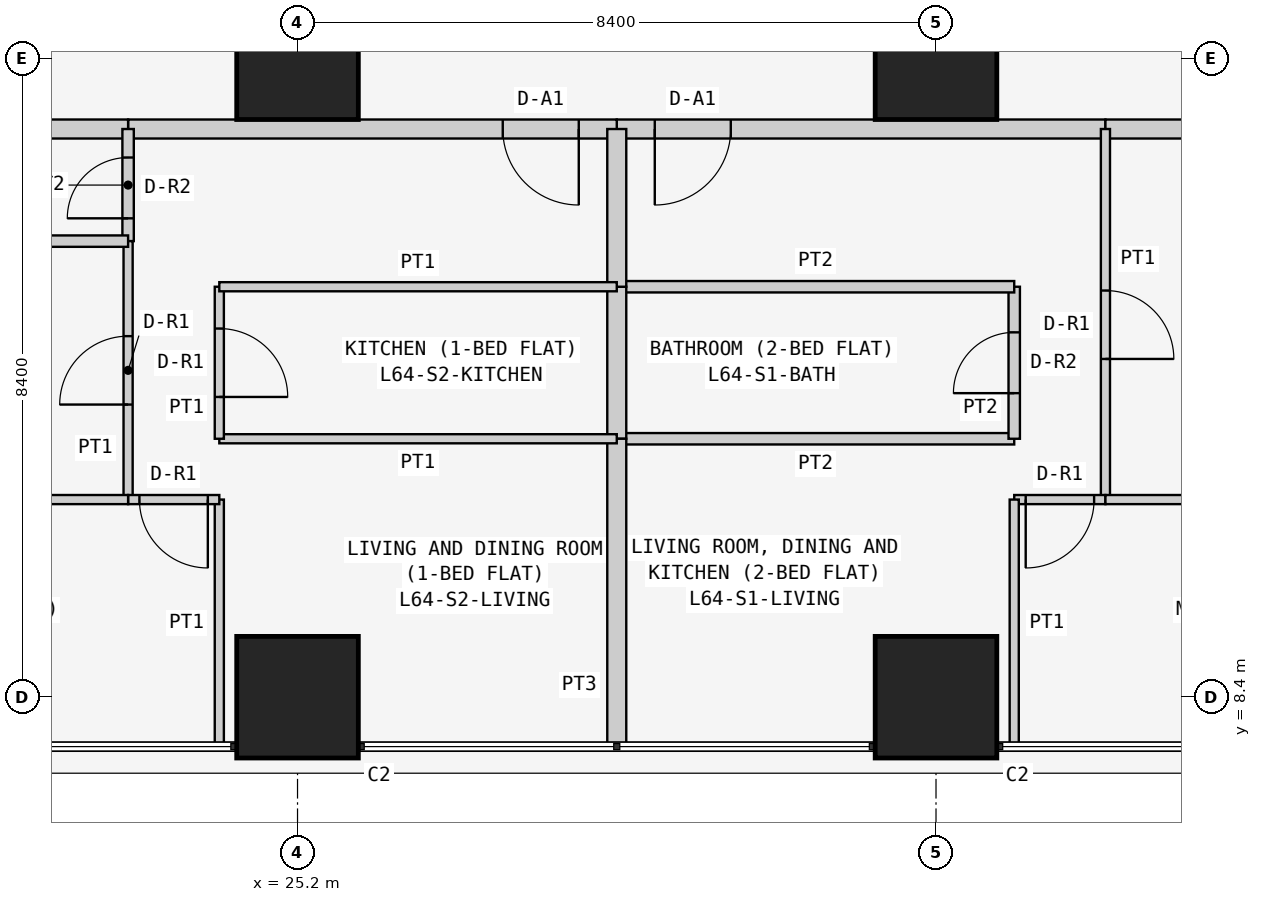
"""IFC4 building model, lengths in metres.
Left out: names, types, materials, properties, quantities, classifications, styles, units other than length and angle.
Written with IfcOpenShell. Run it as: python <this file> out.ifc"""

import sys

from ifc_helpers import new_model, si_unit, direction, frame, frame_2d, origin, origin_2d, place, context, subcontext, project, spatial, rectangle, extrude, element, fill, save


model = new_model("IFC4")
c1 = context("Model", 3, precision=1e-05, world=origin(), true_north=direction((0.0, 1.0)))
c2 = subcontext(c1, "Body", "Model", "MODEL_VIEW")
j1 = project(units=[si_unit("LENGTHUNIT", "METRE"), si_unit("PLANEANGLEUNIT", "RADIAN")], contexts=[c1])
p1 = place(None, origin())
s1 = spatial("IfcSite", under=j1, at=p1, CompositionType="ELEMENT")
p2 = place(p1, origin())
s2 = spatial("IfcBuilding", under=s1, at=p2, CompositionType="ELEMENT")
p3 = place(p2, frame((0.0, 0.0, 244.5)))
s3 = spatial("IfcBuildingStorey", under=s2, at=p3, CompositionType="ELEMENT", Elevation=244.5)
for number, where, z_axis, x_axis in (
    (1, (25.2, 8.4, 0.0), (0.0, 0.0, 1.0), (1.0, 0.0, 0.0)),
    (2, (25.2, 16.8, 0.0), (0.0, 0.0, 1.0), (1.0, 0.0, 0.0)),
    (3, (33.6, 8.4, 0.0), (0.0, 0.0, 1.0), (1.0, 0.0, 0.0)),
    (4, (33.6, 16.8, 0.0), (0.0, 0.0, 1.0), (1.0, 0.0, 0.0)),
):
    element("IfcColumn", number, at=place(p3, frame(where, z_axis=z_axis, x_axis=x_axis)), inside=s3, PredefinedType="COLUMN", context=c2, shape_type="SweptSolid", body=[
        extrude(rectangle(XDim=1.6, YDim=1.6, at=origin_2d()), origin(), (0.0, 0.0, 1.0), 3.6),
    ])
p4 = place(p3, frame((35.829, 15.875, 0.0), z_axis=(0.0, 0.0, 1.0), x_axis=(-1.0, 0.0, 0.0)))
e5 = element("IfcWall", 5, at=p4, inside=s3, PredefinedType="PARTITIONING", context=c2, shape_type="SweptSolid", body=[
    extrude(rectangle(XDim=6.429, YDim=0.25, at=frame_2d((3.215, 0.0))), origin(), (0.0, 0.0, 1.0), 3.35),
])
p5 = place(p4, frame((4.929, 0.0, 0.0)))
e6 = element("IfcOpeningElement", 6, at=p5, cuts=e5, PredefinedType="OPENING", context=c2, shape_type="SweptSolid", body=[
    extrude(rectangle(XDim=1.0, YDim=2.1, at=frame_2d((0.5, 1.05))), frame((0.0, 0.135, 0.0), z_axis=(0.0, -1.0, 0.0), x_axis=(1.0, 0.0, 0.0)), (0.0, 0.0, 1.0), 0.27),
])
p6 = place(p3, frame((42.7, 15.875, 0.0), z_axis=(0.0, 0.0, 1.0), x_axis=(-1.0, 0.0, 0.0)))
e7 = element("IfcWall", 7, at=p6, inside=s3, PredefinedType="PARTITIONING", context=c2, shape_type="SweptSolid", body=[
    extrude(rectangle(XDim=6.871, YDim=0.25, at=frame_2d((3.436, 0.0))), origin(), (0.0, 0.0, 1.0), 3.35),
])
p7 = place(p3, frame((29.4, 15.875, 0.0), z_axis=(0.0, 0.0, 1.0), x_axis=(-1.0, 0.0, 0.0)))
e8 = element("IfcWall", 8, at=p7, inside=s3, PredefinedType="PARTITIONING", context=c2, shape_type="SweptSolid", body=[
    extrude(rectangle(XDim=6.429, YDim=0.25, at=frame_2d((3.214, 0.0))), origin(), (0.0, 0.0, 1.0), 3.35),
])
p8 = place(p7, frame((0.5, 0.0, 0.0)))
e9 = element("IfcOpeningElement", 9, at=p8, cuts=e8, PredefinedType="OPENING", context=c2, shape_type="SweptSolid", body=[
    extrude(rectangle(XDim=1.0, YDim=2.1, at=frame_2d((0.5, 1.05))), frame((0.0, 0.135, 0.0), z_axis=(0.0, -1.0, 0.0), x_axis=(1.0, 0.0, 0.0)), (0.0, 0.0, 1.0), 0.27),
])
p9 = place(p3, frame((22.971, 15.875, 0.0), z_axis=(0.0, 0.0, 1.0), x_axis=(-1.0, 0.0, 0.0)))
e10 = element("IfcWall", 10, at=p9, inside=s3, PredefinedType="PARTITIONING", context=c2, shape_type="SweptSolid", body=[
    extrude(rectangle(XDim=6.871, YDim=0.25, at=frame_2d((3.436, 0.0))), origin(), (0.0, 0.0, 1.0), 3.35),
])
p10 = place(p3, frame((29.4, 11.8, 0.0), z_axis=(0.0, 0.0, 1.0), x_axis=(1.0, 0.0, 0.0)))
e11 = element("IfcWall", 11, at=p10, inside=s3, PredefinedType="PARTITIONING", context=c2, shape_type="SweptSolid", body=[
    extrude(rectangle(XDim=5.229, YDim=0.15, at=frame_2d((2.615, 0.0))), origin(), (0.0, 0.0, 1.0), 3.35),
])
p11 = place(p3, frame((34.629, 11.8, 0.0), z_axis=(0.0, 0.0, 1.0), x_axis=(0.0, 1.0, 0.0)))
e12 = element("IfcWall", 12, at=p11, inside=s3, PredefinedType="PARTITIONING", context=c2, shape_type="SweptSolid", body=[
    extrude(rectangle(XDim=2.0, YDim=0.15, at=frame_2d((1.0, 0.0))), origin(), (0.0, 0.0, 1.0), 3.35),
])
p12 = place(p11, frame((0.6, 0.0, 0.0)))
e13 = element("IfcOpeningElement", 13, at=p12, cuts=e12, PredefinedType="OPENING", context=c2, shape_type="SweptSolid", body=[
    extrude(rectangle(XDim=0.8, YDim=2.1, at=frame_2d((0.4, 1.05))), frame((0.0, 0.085, 0.0), z_axis=(0.0, -1.0, 0.0), x_axis=(1.0, 0.0, 0.0)), (0.0, 0.0, 1.0), 0.17),
])
p13 = place(p3, frame((34.629, 13.8, 0.0), z_axis=(0.0, 0.0, 1.0), x_axis=(-1.0, 0.0, 0.0)))
e14 = element("IfcWall", 14, at=p13, inside=s3, PredefinedType="PARTITIONING", context=c2, shape_type="SweptSolid", body=[
    extrude(rectangle(XDim=5.229, YDim=0.15, at=frame_2d((2.615, 0.0))), origin(), (0.0, 0.0, 1.0), 3.35),
])
p14 = place(p3, frame((29.4, 13.8, 0.0), z_axis=(0.0, 0.0, 1.0), x_axis=(0.0, -1.0, 0.0)))
e15 = element("IfcWall", 15, at=p14, inside=s3, PredefinedType="PARTITIONING", context=c2, shape_type="SweptSolid", body=[
    extrude(rectangle(XDim=2.0, YDim=0.25, at=frame_2d((1.0, 0.0))), origin(), (0.0, 0.0, 1.0), 2.667),
])
p15 = place(p3, frame((35.829, 15.875, 0.0), z_axis=(0.0, 0.0, 1.0), x_axis=(0.0, -1.0, 0.0)))
e16 = element("IfcWall", 16, at=p15, inside=s3, PredefinedType="PARTITIONING", context=c2, shape_type="SweptSolid", body=[
    extrude(rectangle(XDim=4.875, YDim=0.12, at=frame_2d((2.438, 0.0))), origin(), (0.0, 0.0, 1.0), 3.35),
])
p16 = place(p15, frame((2.125, 0.0, 0.0)))
e17 = element("IfcOpeningElement", 17, at=p16, cuts=e16, PredefinedType="OPENING", context=c2, shape_type="SweptSolid", body=[
    extrude(rectangle(XDim=0.9, YDim=2.1, at=frame_2d((0.45, 1.05))), frame((0.0, 0.07, 0.0), z_axis=(0.0, -1.0, 0.0), x_axis=(1.0, 0.0, 0.0)), (0.0, 0.0, 1.0), 0.14),
])
p17 = place(p3, frame((35.829, 11.0, 0.0), z_axis=(0.0, 0.0, 1.0), x_axis=(-1.0, 0.0, 0.0)))
e18 = element("IfcWall", 18, at=p17, inside=s3, PredefinedType="PARTITIONING", context=c2, shape_type="SweptSolid", body=[
    extrude(rectangle(XDim=1.2, YDim=0.12, at=frame_2d((0.6, 0.0))), origin(), (0.0, 0.0, 1.0), 3.35),
])
p18 = place(p17, frame((0.149, 0.0, 0.0)))
e19 = element("IfcOpeningElement", 19, at=p18, cuts=e18, PredefinedType="OPENING", context=c2, shape_type="SweptSolid", body=[
    extrude(rectangle(XDim=0.9, YDim=2.1, at=frame_2d((0.45, 1.05))), frame((0.0, 0.07, 0.0), z_axis=(0.0, -1.0, 0.0), x_axis=(1.0, 0.0, 0.0)), (0.0, 0.0, 1.0), 0.14),
])
p19 = place(p3, frame((34.629, 11.0, 0.0), z_axis=(0.0, 0.0, 1.0), x_axis=(0.0, -1.0, 0.0)))
e20 = element("IfcWall", 20, at=p19, inside=s3, PredefinedType="PARTITIONING", context=c2, shape_type="SweptSolid", body=[
    extrude(rectangle(XDim=3.25, YDim=0.12, at=frame_2d((1.625, 0.0))), origin(), (0.0, 0.0, 1.0), 3.35),
])
p20 = place(p3, frame((29.4, 7.75, 0.0), z_axis=(0.0, 0.0, 1.0), x_axis=(0.0, 1.0, 0.0)))
e21 = element("IfcWall", 21, at=p20, inside=s3, PredefinedType="PARTITIONING", context=c2, shape_type="SweptSolid", body=[
    extrude(rectangle(XDim=4.05, YDim=0.25, at=frame_2d((2.025, 0.0))), origin(), (0.0, 0.0, 1.0), 2.667),
])
p21 = place(p3, frame((29.4, 13.8, 0.0), z_axis=(0.0, 0.0, 1.0), x_axis=(0.0, 1.0, 0.0)))
e22 = element("IfcWall", 22, at=p21, inside=s3, PredefinedType="PARTITIONING", context=c2, shape_type="SweptSolid", body=[
    extrude(rectangle(XDim=2.075, YDim=0.25, at=frame_2d((1.038, 0.0))), origin(), (0.0, 0.0, 1.0), 2.667),
])
p22 = place(p3, frame((35.829, 11.0, 0.0), z_axis=(0.0, 0.0, 1.0), x_axis=(1.0, 0.0, 0.0)))
e23 = element("IfcWall", 23, at=p22, inside=s3, PredefinedType="PARTITIONING", context=c2, shape_type="SweptSolid", body=[
    extrude(rectangle(XDim=6.871, YDim=0.12, at=frame_2d((3.436, 0.0))), origin(), (0.0, 0.0, 1.0), 3.35),
])
p23 = place(p3, frame((29.4, 11.8, 0.0), z_axis=(0.0, 0.0, 1.0), x_axis=(-1.0, 0.0, 0.0)))
e24 = element("IfcWall", 24, at=p23, inside=s3, PredefinedType="PARTITIONING", context=c2, shape_type="SweptSolid", body=[
    extrude(rectangle(XDim=5.229, YDim=0.12, at=frame_2d((2.615, 0.0))), origin(), (0.0, 0.0, 1.0), 3.35),
])
p24 = place(p3, frame((24.171, 11.8, 0.0), z_axis=(0.0, 0.0, 1.0), x_axis=(0.0, 1.0, 0.0)))
e25 = element("IfcWall", 25, at=p24, inside=s3, PredefinedType="PARTITIONING", context=c2, shape_type="SweptSolid", body=[
    extrude(rectangle(XDim=2.0, YDim=0.12, at=frame_2d((1.0, 0.0))), origin(), (0.0, 0.0, 1.0), 3.35),
])
p25 = place(p24, frame((0.55, 0.0, 0.0)))
e26 = element("IfcOpeningElement", 26, at=p25, cuts=e25, PredefinedType="OPENING", context=c2, shape_type="SweptSolid", body=[
    extrude(rectangle(XDim=0.9, YDim=2.1, at=frame_2d((0.45, 1.05))), frame((0.0, 0.07, 0.0), z_axis=(0.0, -1.0, 0.0), x_axis=(1.0, 0.0, 0.0)), (0.0, 0.0, 1.0), 0.14),
])
p26 = place(p3, frame((24.171, 13.8, 0.0), z_axis=(0.0, 0.0, 1.0), x_axis=(1.0, 0.0, 0.0)))
e27 = element("IfcWall", 27, at=p26, inside=s3, PredefinedType="PARTITIONING", context=c2, shape_type="SweptSolid", body=[
    extrude(rectangle(XDim=5.229, YDim=0.12, at=frame_2d((2.615, 0.0))), origin(), (0.0, 0.0, 1.0), 3.35),
])
p27 = place(p3, frame((22.971, 14.4, 0.0), z_axis=(0.0, 0.0, 1.0), x_axis=(0.0, 1.0, 0.0)))
e28 = element("IfcWall", 28, at=p27, inside=s3, PredefinedType="PARTITIONING", context=c2, shape_type="SweptSolid", body=[
    extrude(rectangle(XDim=1.475, YDim=0.15, at=frame_2d((0.738, 0.0))), origin(), (0.0, 0.0, 1.0), 3.35),
])
p28 = place(p27, frame((0.3, 0.0, 0.0)))
e29 = element("IfcOpeningElement", 29, at=p28, cuts=e28, PredefinedType="OPENING", context=c2, shape_type="SweptSolid", body=[
    extrude(rectangle(XDim=0.8, YDim=2.1, at=frame_2d((0.4, 1.05))), frame((0.0, 0.085, 0.0), z_axis=(0.0, -1.0, 0.0), x_axis=(1.0, 0.0, 0.0)), (0.0, 0.0, 1.0), 0.17),
])
p29 = place(p3, frame((22.971, 11.0, 0.0), z_axis=(0.0, 0.0, 1.0), x_axis=(0.0, 1.0, 0.0)))
e30 = element("IfcWall", 30, at=p29, inside=s3, PredefinedType="PARTITIONING", context=c2, shape_type="SweptSolid", body=[
    extrude(rectangle(XDim=3.4, YDim=0.12, at=frame_2d((1.7, 0.0))), origin(), (0.0, 0.0, 1.0), 3.35),
])
p30 = place(p29, frame((1.25, 0.0, 0.0)))
e31 = element("IfcOpeningElement", 31, at=p30, cuts=e30, PredefinedType="OPENING", context=c2, shape_type="SweptSolid", body=[
    extrude(rectangle(XDim=0.9, YDim=2.1, at=frame_2d((0.45, 1.05))), frame((0.0, 0.07, 0.0), z_axis=(0.0, -1.0, 0.0), x_axis=(1.0, 0.0, 0.0)), (0.0, 0.0, 1.0), 0.14),
])
p31 = place(p3, frame((24.171, 7.75, 0.0), z_axis=(0.0, 0.0, 1.0), x_axis=(0.0, 1.0, 0.0)))
e32 = element("IfcWall", 32, at=p31, inside=s3, PredefinedType="PARTITIONING", context=c2, shape_type="SweptSolid", body=[
    extrude(rectangle(XDim=3.25, YDim=0.12, at=frame_2d((1.625, 0.0))), origin(), (0.0, 0.0, 1.0), 3.35),
])
p32 = place(p3, frame((24.171, 11.0, 0.0), z_axis=(0.0, 0.0, 1.0), x_axis=(-1.0, 0.0, 0.0)))
e33 = element("IfcWall", 33, at=p32, inside=s3, PredefinedType="PARTITIONING", context=c2, shape_type="SweptSolid", body=[
    extrude(rectangle(XDim=1.2, YDim=0.12, at=frame_2d((0.6, 0.0))), origin(), (0.0, 0.0, 1.0), 3.35),
])
p33 = place(p32, frame((0.151, 0.0, 0.0)))
e34 = element("IfcOpeningElement", 34, at=p33, cuts=e33, PredefinedType="OPENING", context=c2, shape_type="SweptSolid", body=[
    extrude(rectangle(XDim=0.9, YDim=2.1, at=frame_2d((0.45, 1.05))), frame((0.0, 0.07, 0.0), z_axis=(0.0, -1.0, 0.0), x_axis=(1.0, 0.0, 0.0)), (0.0, 0.0, 1.0), 0.14),
])
p34 = place(p3, frame((22.971, 14.4, 0.0), z_axis=(0.0, 0.0, 1.0), x_axis=(-1.0, 0.0, 0.0)))
e35 = element("IfcWall", 35, at=p34, inside=s3, PredefinedType="PARTITIONING", context=c2, shape_type="SweptSolid", body=[
    extrude(rectangle(XDim=6.871, YDim=0.15, at=frame_2d((3.436, 0.0))), origin(), (0.0, 0.0, 1.0), 3.35),
])
p35 = place(p3, frame((22.971, 11.0, 0.0), z_axis=(0.0, 0.0, 1.0), x_axis=(-1.0, 0.0, 0.0)))
e36 = element("IfcWall", 36, at=p35, inside=s3, PredefinedType="PARTITIONING", context=c2, shape_type="SweptSolid", body=[
    extrude(rectangle(XDim=6.871, YDim=0.12, at=frame_2d((3.436, 0.0))), origin(), (0.0, 0.0, 1.0), 3.35),
])
p36 = place(p5, origin())
e37 = element("IfcDoor", 37, at=p36, inside=s3, OperationType="SINGLE_SWING_RIGHT", PredefinedType="DOOR", context=c2, shape_type="SweptSolid", body=[
    extrude(rectangle(XDim=1.0, YDim=2.1, at=frame_2d((0.5, 1.05))), frame((0.0, 0.025, 0.0), z_axis=(0.0, -1.0, 0.0), x_axis=(1.0, 0.0, 0.0)), (0.0, 0.0, 1.0), 0.05),
])
fill(e6, e37)
p37 = place(p12, origin())
e38 = element("IfcDoor", 38, at=p37, inside=s3, OperationType="SINGLE_SWING_LEFT", PredefinedType="DOOR", context=c2, shape_type="SweptSolid", body=[
    extrude(rectangle(XDim=0.8, YDim=2.1, at=frame_2d((0.4, 1.05))), frame((0.0, 0.025, 0.0), z_axis=(0.0, -1.0, 0.0), x_axis=(1.0, 0.0, 0.0)), (0.0, 0.0, 1.0), 0.05),
])
fill(e13, e38)
p38 = place(p16, origin())
e39 = element("IfcDoor", 39, at=p38, inside=s3, OperationType="SINGLE_SWING_RIGHT", PredefinedType="DOOR", context=c2, shape_type="SweptSolid", body=[
    extrude(rectangle(XDim=0.9, YDim=2.1, at=frame_2d((0.45, 1.05))), frame((0.0, 0.025, 0.0), z_axis=(0.0, -1.0, 0.0), x_axis=(1.0, 0.0, 0.0)), (0.0, 0.0, 1.0), 0.05),
])
fill(e17, e39)
p39 = place(p18, origin())
e40 = element("IfcDoor", 40, at=p39, inside=s3, OperationType="SINGLE_SWING_RIGHT", PredefinedType="DOOR", context=c2, shape_type="SweptSolid", body=[
    extrude(rectangle(XDim=0.9, YDim=2.1, at=frame_2d((0.45, 1.05))), frame((0.0, 0.025, 0.0), z_axis=(0.0, -1.0, 0.0), x_axis=(1.0, 0.0, 0.0)), (0.0, 0.0, 1.0), 0.05),
])
fill(e19, e40)
p40 = place(p8, origin())
e41 = element("IfcDoor", 41, at=p40, inside=s3, OperationType="SINGLE_SWING_LEFT", PredefinedType="DOOR", context=c2, shape_type="SweptSolid", body=[
    extrude(rectangle(XDim=1.0, YDim=2.1, at=frame_2d((0.5, 1.05))), frame((0.0, 0.025, 0.0), z_axis=(0.0, -1.0, 0.0), x_axis=(1.0, 0.0, 0.0)), (0.0, 0.0, 1.0), 0.05),
])
fill(e9, e41)
p41 = place(p25, frame((0.9, 0.0, 0.0), z_axis=(0.0, 0.0, 1.0), x_axis=(-1.0, 0.0, 0.0)))
e42 = element("IfcDoor", 42, at=p41, inside=s3, OperationType="SINGLE_SWING_RIGHT", PredefinedType="DOOR", context=c2, shape_type="SweptSolid", body=[
    extrude(rectangle(XDim=0.9, YDim=2.1, at=frame_2d((0.45, 1.05))), frame((0.0, 0.025, 0.0), z_axis=(0.0, -1.0, 0.0), x_axis=(1.0, 0.0, 0.0)), (0.0, 0.0, 1.0), 0.05),
])
fill(e26, e42)
p42 = place(p28, origin())
e43 = element("IfcDoor", 43, at=p42, inside=s3, OperationType="SINGLE_SWING_LEFT", PredefinedType="DOOR", context=c2, shape_type="SweptSolid", body=[
    extrude(rectangle(XDim=0.8, YDim=2.1, at=frame_2d((0.4, 1.05))), frame((0.0, 0.025, 0.0), z_axis=(0.0, -1.0, 0.0), x_axis=(1.0, 0.0, 0.0)), (0.0, 0.0, 1.0), 0.05),
])
fill(e29, e43)
p43 = place(p30, origin())
e44 = element("IfcDoor", 44, at=p43, inside=s3, OperationType="SINGLE_SWING_LEFT", PredefinedType="DOOR", context=c2, shape_type="SweptSolid", body=[
    extrude(rectangle(XDim=0.9, YDim=2.1, at=frame_2d((0.45, 1.05))), frame((0.0, 0.025, 0.0), z_axis=(0.0, -1.0, 0.0), x_axis=(1.0, 0.0, 0.0)), (0.0, 0.0, 1.0), 0.05),
])
fill(e31, e44)
p44 = place(p33, origin())
e45 = element("IfcDoor", 45, at=p44, inside=s3, OperationType="SINGLE_SWING_LEFT", PredefinedType="DOOR", context=c2, shape_type="SweptSolid", body=[
    extrude(rectangle(XDim=0.9, YDim=2.1, at=frame_2d((0.45, 1.05))), frame((0.0, 0.025, 0.0), z_axis=(0.0, -1.0, 0.0), x_axis=(1.0, 0.0, 0.0)), (0.0, 0.0, 1.0), 0.05),
])
fill(e34, e45)
save(model, sys.argv[1])
